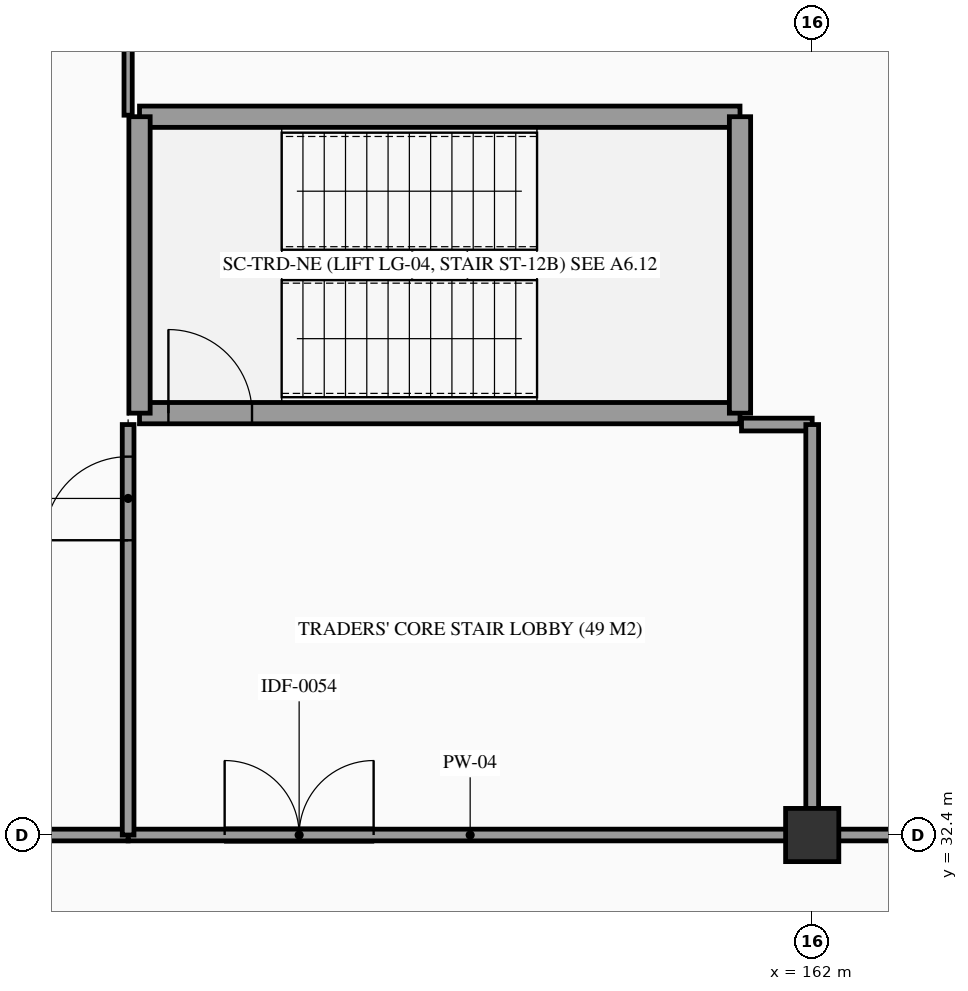
"""IFC4 building model, lengths in metres.
Left out: names, types, materials, properties, quantities, classifications, styles, units other than length and angle.
Written with IfcOpenShell. Run it as: python <this file> out.ifc"""

import sys

from ifc_helpers import new_model, si_unit, direction, frame, frame_2d, origin, origin_2d, place, context, subcontext, project, spatial, rectangle, extrude, element, fill, save


model = new_model("IFC4")
c1 = context("Model", 3, precision=1e-05, world=origin(), true_north=direction((0.0, 1.0)))
c2 = subcontext(c1, "Body", "Model", "MODEL_VIEW")
j1 = project(units=[si_unit("LENGTHUNIT", "METRE"), si_unit("PLANEANGLEUNIT", "RADIAN")], contexts=[c1])
p1 = place(None, origin())
s1 = spatial("IfcSite", under=j1, at=p1, CompositionType="ELEMENT")
p2 = place(p1, origin())
s2 = spatial("IfcBuilding", under=s1, at=p2, CompositionType="ELEMENT")
p3 = place(p2, frame((0.0, 0.0, 5.4)))
s3 = spatial("IfcBuildingStorey", under=s2, at=p3, CompositionType="ELEMENT", Elevation=5.4)
p4 = place(p3, frame((162.0, 32.4, 0.0), z_axis=(0.0, 0.0, 1.0), x_axis=(1.0, 0.0, 0.0)))
e1 = element("IfcColumn", 1, at=p4, inside=s3, PredefinedType="COLUMN", context=c2, shape_type="SweptSolid", body=[
    extrude(rectangle(XDim=0.7, YDim=0.7, at=origin_2d()), origin(), (0.0, 0.0, 1.0), 4.68),
])
p5 = place(p3, frame((153.15, 37.95, 0.0), z_axis=(0.0, 0.0, 1.0), x_axis=(1.0, 0.0, 0.0)))
e2 = element("IfcWall", 2, at=p5, inside=s3, PredefinedType="SHEAR", context=c2, shape_type="SweptSolid", body=[
    extrude(rectangle(XDim=7.9, YDim=0.28, at=frame_2d((3.95, 0.0))), origin(), (0.0, 0.0, 1.0), 4.68),
])
p6 = place(p5, frame((0.38, 0.0, 0.0)))
e3 = element("IfcOpeningElement", 3, at=p6, cuts=e2, PredefinedType="OPENING", context=c2, shape_type="SweptSolid", body=[
    extrude(rectangle(XDim=1.1, YDim=2.2, at=frame_2d((0.55, 1.1))), frame((0.0, 0.15, 0.0), z_axis=(0.0, -1.0, 0.0), x_axis=(1.0, 0.0, 0.0)), (0.0, 0.0, 1.0), 0.3),
])
p7 = place(p3, frame((153.15, 41.85, 0.0), z_axis=(0.0, 0.0, 1.0), x_axis=(1.0, 0.0, 0.0)))
e4 = element("IfcWall", 4, at=p7, inside=s3, PredefinedType="SHEAR", context=c2, shape_type="SweptSolid", body=[
    extrude(rectangle(XDim=7.9, YDim=0.28, at=frame_2d((3.95, 0.0))), origin(), (0.0, 0.0, 1.0), 4.68),
])
for number, where, z_axis, x_axis in (
    (5, (153.15, 37.95, 0.0), (0.0, 0.0, 1.0), (0.0, 1.0, 0.0)),
    (6, (161.05, 37.95, 0.0), (0.0, 0.0, 1.0), (0.0, 1.0, 0.0)),
):
    element("IfcWall", number, at=place(p3, frame(where, z_axis=z_axis, x_axis=x_axis)), inside=s3, PredefinedType="SHEAR", context=c2, shape_type="SweptSolid", body=[
        extrude(rectangle(XDim=3.9, YDim=0.28, at=frame_2d((1.95, 0.0))), origin(), (0.0, 0.0, 1.0), 4.68),
    ])
p8 = place(p3, frame((153.0, 32.4, 0.0), z_axis=(0.0, 0.0, 1.0), x_axis=(1.0, 0.0, 0.0)))
e7 = element("IfcWall", 7, at=p8, inside=s3, PredefinedType="PARTITIONING", context=c2, shape_type="SweptSolid", body=[
    extrude(rectangle(XDim=9.0, YDim=0.154, at=frame_2d((4.5, 0.0))), origin(), (0.0, 0.0, 1.0), 3.23),
])
p9 = place(p8, frame((1.27, 0.0, 0.0)))
e8 = element("IfcOpeningElement", 8, at=p9, cuts=e7, PredefinedType="OPENING", context=c2, shape_type="SweptSolid", body=[
    extrude(rectangle(XDim=1.96, YDim=2.3, at=frame_2d((0.98, 1.15))), frame((0.0, 0.087, 0.0), z_axis=(0.0, -1.0, 0.0), x_axis=(1.0, 0.0, 0.0)), (0.0, 0.0, 1.0), 0.174),
])
p10 = place(p3, frame((129.6, 32.4, 0.0), z_axis=(0.0, 0.0, 1.0), x_axis=(1.0, 0.0, 0.0)))
e9 = element("IfcWall", 9, at=p10, inside=s3, PredefinedType="PARTITIONING", context=c2, shape_type="SweptSolid", body=[
    extrude(rectangle(XDim=23.4, YDim=0.154, at=frame_2d((11.7, 0.0))), origin(), (0.0, 0.0, 1.0), 3.23),
])
p11 = place(p10, frame((18.638, 0.0, 0.0)))
e10 = element("IfcOpeningElement", 10, at=p11, cuts=e9, PredefinedType="OPENING", context=c2, shape_type="SweptSolid", body=[
    extrude(rectangle(XDim=1.1, YDim=2.2, at=frame_2d((0.55, 1.1))), frame((0.0, 0.087, 0.0), z_axis=(0.0, -1.0, 0.0), x_axis=(1.0, 0.0, 0.0)), (0.0, 0.0, 1.0), 0.174),
])
p12 = place(p3, frame((153.0, 32.4, 0.0), z_axis=(0.0, 0.0, 1.0), x_axis=(0.0, 1.0, 0.0)))
e11 = element("IfcWall", 11, at=p12, inside=s3, PredefinedType="PARTITIONING", context=c2, shape_type="SweptSolid", body=[
    extrude(rectangle(XDim=5.4, YDim=0.154, at=frame_2d((2.7, 0.0))), origin(), (0.0, 0.0, 1.0), 3.23),
])
p13 = place(p12, frame((3.878, 0.0, 0.0)))
e12 = element("IfcOpeningElement", 12, at=p13, cuts=e11, PredefinedType="OPENING", context=c2, shape_type="SweptSolid", body=[
    extrude(rectangle(XDim=1.1, YDim=2.2, at=frame_2d((0.55, 1.1))), frame((0.0, 0.087, 0.0), z_axis=(0.0, -1.0, 0.0), x_axis=(1.0, 0.0, 0.0)), (0.0, 0.0, 1.0), 0.174),
])
p14 = place(p3, frame((161.07, 37.8, 0.0), z_axis=(0.0, 0.0, 1.0), x_axis=(1.0, 0.0, 0.0)))
e13 = element("IfcWall", 13, at=p14, inside=s3, PredefinedType="PARTITIONING", context=c2, shape_type="SweptSolid", body=[
    extrude(rectangle(XDim=0.93, YDim=0.168, at=frame_2d((0.465, 0.0))), origin(), (0.0, 0.0, 1.0), 3.23),
])
p15 = place(p3, frame((153.0, 41.87, 0.0), z_axis=(0.0, 0.0, 1.0), x_axis=(0.0, 1.0, 0.0)))
e14 = element("IfcWall", 14, at=p15, inside=s3, PredefinedType="PARTITIONING", context=c2, shape_type="SweptSolid", body=[
    extrude(rectangle(XDim=1.33, YDim=0.108, at=frame_2d((0.665, 0.0))), origin(), (0.0, 0.0, 1.0), 3.23),
])
p16 = place(p3, frame((162.0, 32.4, 0.0), z_axis=(0.0, 0.0, 1.0), x_axis=(1.0, 0.0, 0.0)))
e15 = element("IfcWall", 15, at=p16, inside=s3, PredefinedType="PARTITIONING", context=c2, shape_type="SweptSolid", body=[
    extrude(rectangle(XDim=10.8, YDim=0.154, at=frame_2d((5.4, 0.0))), origin(), (0.0, 0.0, 1.0), 3.23),
])
p17 = place(p3, frame((162.0, 32.4, 0.0), z_axis=(0.0, 0.0, 1.0), x_axis=(0.0, 1.0, 0.0)))
e16 = element("IfcWall", 16, at=p17, inside=s3, PredefinedType="PARTITIONING", context=c2, shape_type="SweptSolid", body=[
    extrude(rectangle(XDim=5.4, YDim=0.168, at=frame_2d((2.7, 0.0))), origin(), (0.0, 0.0, 1.0), 3.23),
])
p18 = place(p6, frame((1.1, 0.0, 0.0), z_axis=(0.0, 0.0, 1.0), x_axis=(-1.0, 0.0, 0.0)))
e17 = element("IfcDoor", 17, at=p18, inside=s3, OperationType="SINGLE_SWING_LEFT", PredefinedType="DOOR", context=c2, shape_type="SweptSolid", body=[
    extrude(rectangle(XDim=1.1, YDim=2.2, at=frame_2d((0.55, 1.1))), frame((0.0, 0.025, 0.0), z_axis=(0.0, -1.0, 0.0), x_axis=(1.0, 0.0, 0.0)), (0.0, 0.0, 1.0), 0.05),
])
fill(e3, e17)
p19 = place(p9, frame((1.96, 0.0, 0.0), z_axis=(0.0, 0.0, 1.0), x_axis=(-1.0, 0.0, 0.0)))
e18 = element("IfcDoor", 18, at=p19, inside=s3, OperationType="DOUBLE_DOOR_SINGLE_SWING", PredefinedType="DOOR", context=c2, shape_type="SweptSolid", body=[
    extrude(rectangle(XDim=1.96, YDim=2.3, at=frame_2d((0.98, 1.15))), frame((0.0, 0.025, 0.0), z_axis=(0.0, -1.0, 0.0), x_axis=(1.0, 0.0, 0.0)), (0.0, 0.0, 1.0), 0.05),
])
fill(e8, e18)
p20 = place(p13, origin())
e19 = element("IfcDoor", 19, at=p20, inside=s3, OperationType="SINGLE_SWING_LEFT", PredefinedType="DOOR", context=c2, shape_type="SweptSolid", body=[
    extrude(rectangle(XDim=1.1, YDim=2.2, at=frame_2d((0.55, 1.1))), frame((0.0, 0.025, 0.0), z_axis=(0.0, -1.0, 0.0), x_axis=(1.0, 0.0, 0.0)), (0.0, 0.0, 1.0), 0.05),
])
fill(e12, e19)
save(model, sys.argv[1])
